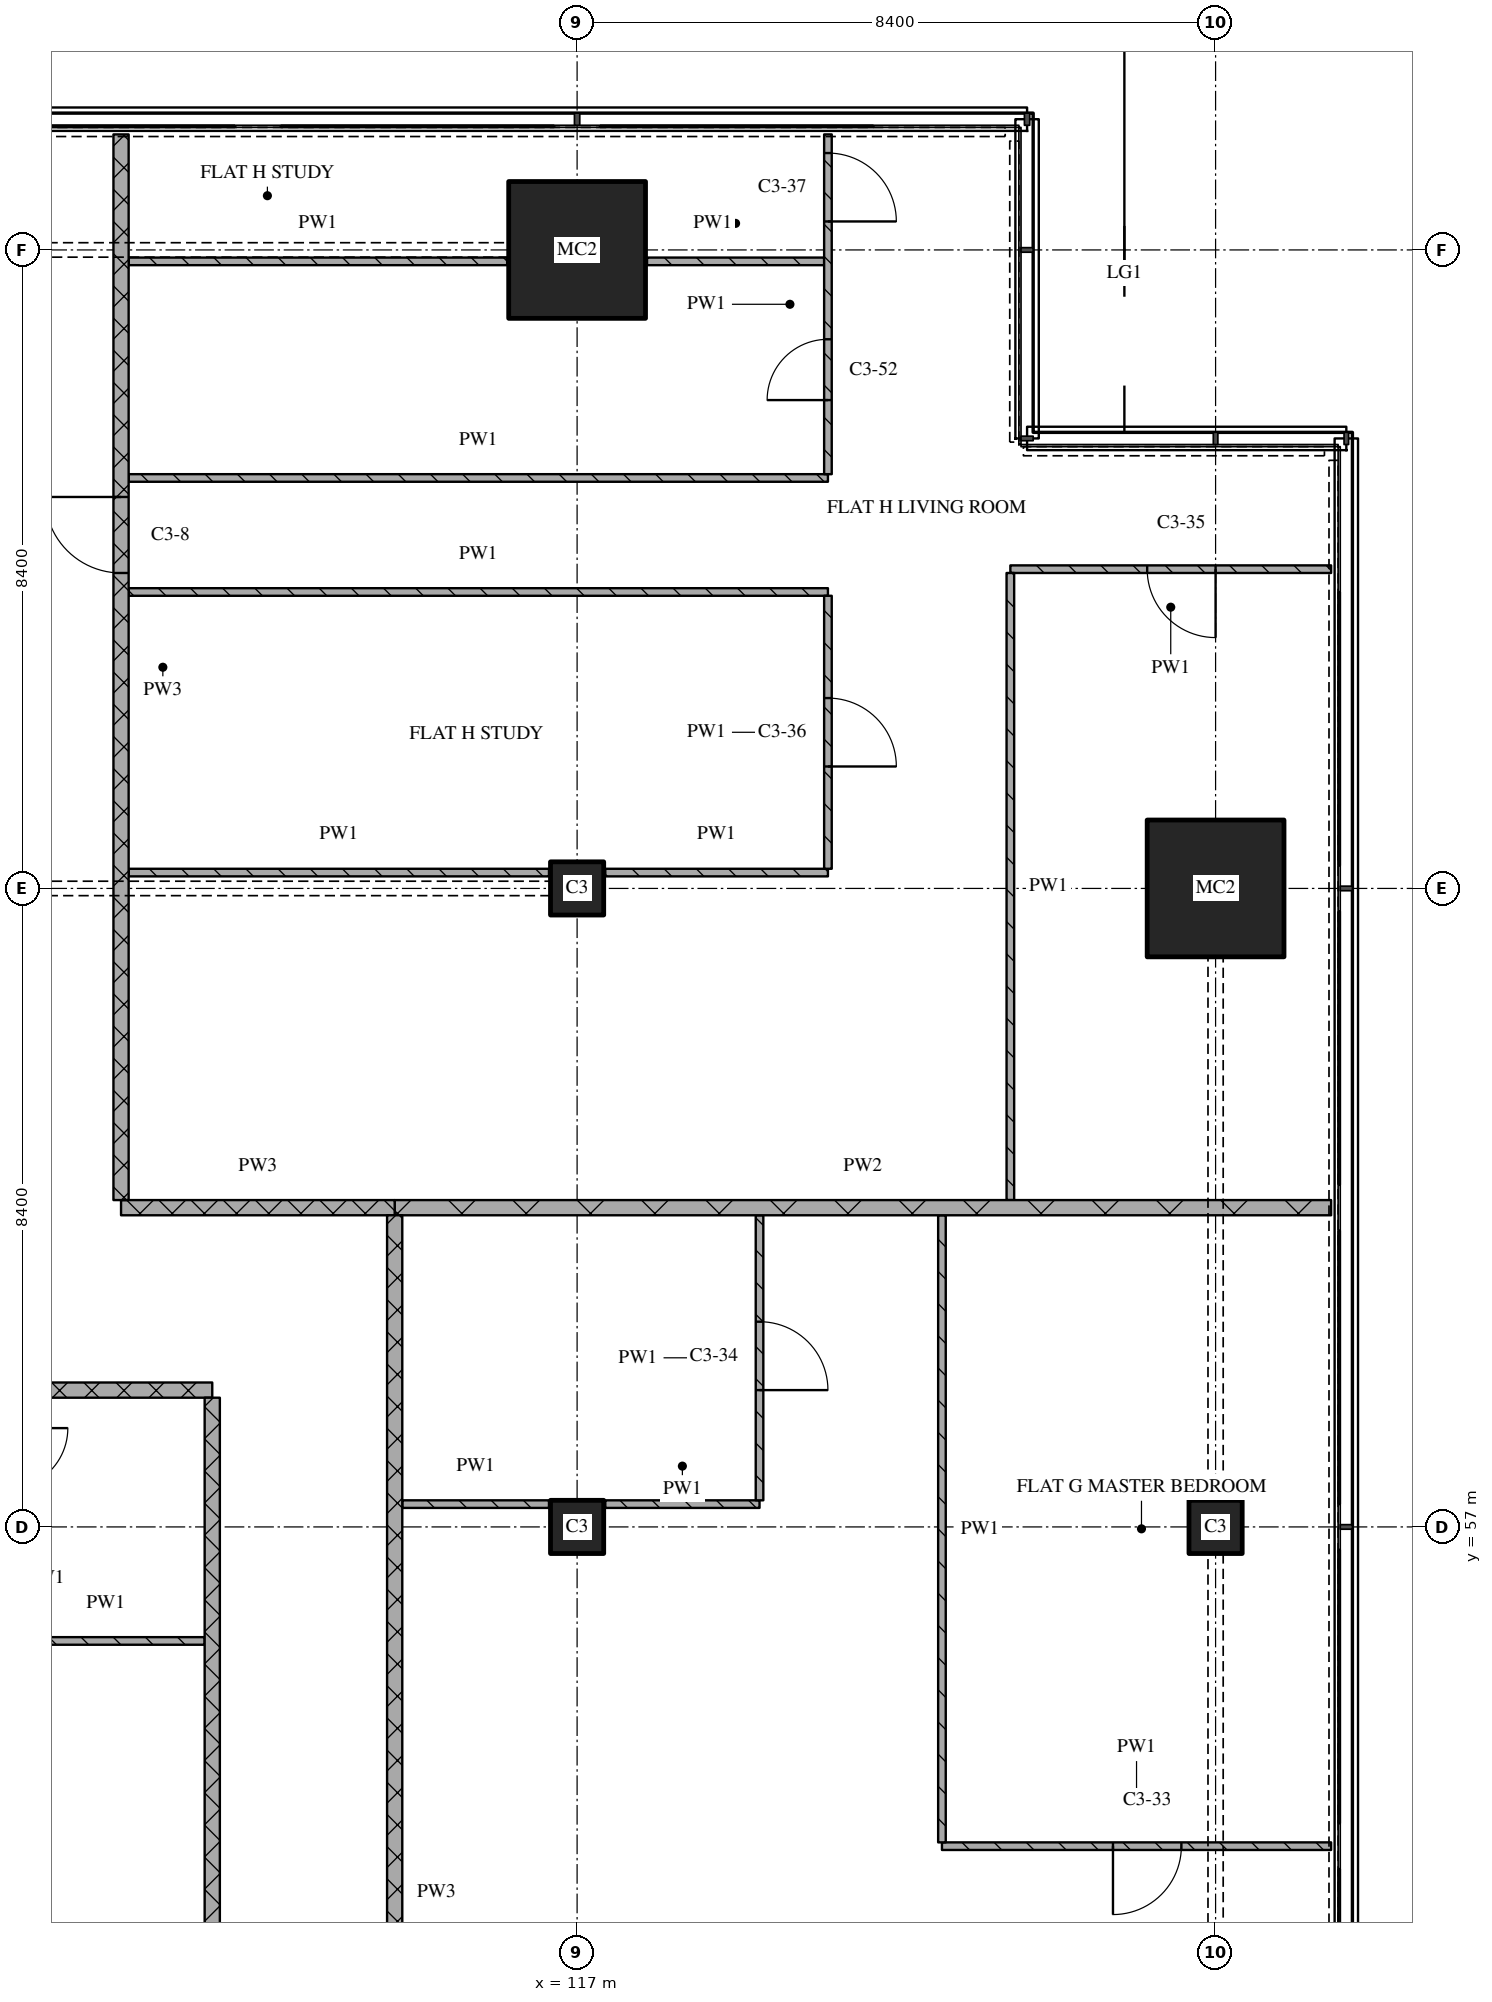
"""IFC4 building model, lengths in metres.
Left out: names, types, materials, properties, quantities, classifications, styles, units other than length and angle.
Written with IfcOpenShell. Run it as: python <this file> out.ifc"""

import sys

from ifc_helpers import new_model, si_unit, direction, frame, frame_2d, origin, origin_2d, place, context, subcontext, project, spatial, rectangle, extrude, element, fill, save


model = new_model("IFC4")
c1 = context("Model", 3, precision=1e-05, world=origin(), true_north=direction((0.0, 1.0)))
c2 = subcontext(c1, "Body", "Model", "MODEL_VIEW")
j1 = project(units=[si_unit("LENGTHUNIT", "METRE"), si_unit("PLANEANGLEUNIT", "RADIAN")], contexts=[c1])
p1 = place(None, origin())
s1 = spatial("IfcSite", under=j1, at=p1, CompositionType="ELEMENT")
p2 = place(p1, origin())
s2 = spatial("IfcBuilding", under=s1, at=p2, CompositionType="ELEMENT")
p3 = place(p2, frame((0.0, 0.0, 169.05)))
s3 = spatial("IfcBuildingStorey", under=s2, at=p3, CompositionType="ELEMENT", Elevation=169.05)
for number, where, z_axis, x_axis in (
    (1, (117.0, 57.0, 0.0), (0.0, 0.0, 1.0), (1.0, 0.0, 0.0)),
    (2, (117.0, 65.4, 0.0), (0.0, 0.0, 1.0), (1.0, 0.0, 0.0)),
):
    element("IfcColumn", number, at=place(p3, frame(where, z_axis=z_axis, x_axis=x_axis)), inside=s3, PredefinedType="COLUMN", context=c2, shape_type="SweptSolid", body=[
        extrude(rectangle(XDim=0.7, YDim=0.7, at=origin_2d()), origin(), (0.0, 0.0, 1.0), 3.6),
    ])
p4 = place(p3, frame((117.0, 73.8, 0.0), z_axis=(0.0, 0.0, 1.0), x_axis=(1.0, 0.0, 0.0)))
e3 = element("IfcColumn", 3, at=p4, inside=s3, PredefinedType="COLUMN", context=c2, shape_type="SweptSolid", body=[
    extrude(rectangle(XDim=1.8, YDim=1.8, at=origin_2d()), origin(), (0.0, 0.0, 1.0), 3.6),
])
p5 = place(p3, frame((125.4, 57.0, 0.0), z_axis=(0.0, 0.0, 1.0), x_axis=(1.0, 0.0, 0.0)))
e4 = element("IfcColumn", 4, at=p5, inside=s3, PredefinedType="COLUMN", context=c2, shape_type="SweptSolid", body=[
    extrude(rectangle(XDim=0.7, YDim=0.7, at=origin_2d()), origin(), (0.0, 0.0, 1.0), 3.6),
])
p6 = place(p3, frame((125.4, 65.4, 0.0), z_axis=(0.0, 0.0, 1.0), x_axis=(1.0, 0.0, 0.0)))
e5 = element("IfcColumn", 5, at=p6, inside=s3, PredefinedType="COLUMN", context=c2, shape_type="SweptSolid", body=[
    extrude(rectangle(XDim=1.8, YDim=1.8, at=origin_2d()), origin(), (0.0, 0.0, 1.0), 3.6),
])
p7 = place(p3, frame((121.8, 52.8, 0.0), z_axis=(0.0, 0.0, 1.0), x_axis=(1.0, 0.0, 0.0)))
e6 = element("IfcWall", 6, at=p7, inside=s3, PredefinedType="PARTITIONING", context=c2, shape_type="SweptSolid", body=[
    extrude(rectangle(XDim=5.12, YDim=0.1, at=frame_2d((2.56, 0.0))), origin(), (0.0, 0.0, 1.0), 3.32),
])
p8 = place(p7, frame((2.25, 0.0, 0.0)))
e7 = element("IfcOpeningElement", 7, at=p8, cuts=e6, PredefinedType="OPENING", context=c2, shape_type="SweptSolid", body=[
    extrude(rectangle(XDim=0.9, YDim=2.1, at=frame_2d((0.45, 1.05))), frame((0.0, 0.06, 0.0), z_axis=(0.0, -1.0, 0.0), x_axis=(1.0, 0.0, 0.0)), (0.0, 0.0, 1.0), 0.12),
])
p9 = place(p3, frame((109.5, 55.5, 0.0), z_axis=(0.0, 0.0, 1.0), x_axis=(1.0, 0.0, 0.0)))
e8 = element("IfcWall", 8, at=p9, inside=s3, PredefinedType="PARTITIONING", context=c2, shape_type="SweptSolid", body=[
    extrude(rectangle(XDim=2.6, YDim=0.1, at=frame_2d((1.3, 0.0))), origin(), (0.0, 0.0, 1.0), 3.32),
])
p10 = place(p3, frame((114.7, 57.3, 0.0), z_axis=(0.0, 0.0, 1.0), x_axis=(1.0, 0.0, 0.0)))
e9 = element("IfcWall", 9, at=p10, inside=s3, PredefinedType="PARTITIONING", context=c2, shape_type="SweptSolid", body=[
    extrude(rectangle(XDim=1.93, YDim=0.1, at=frame_2d((0.965, 0.0))), origin(), (0.0, 0.0, 1.0), 3.32),
])
p11 = place(p3, frame((117.37, 57.3, 0.0), z_axis=(0.0, 0.0, 1.0), x_axis=(1.0, 0.0, 0.0)))
e10 = element("IfcWall", 10, at=p11, inside=s3, PredefinedType="PARTITIONING", context=c2, shape_type="SweptSolid", body=[
    extrude(rectangle(XDim=2.03, YDim=0.1, at=frame_2d((1.015, 0.0))), origin(), (0.0, 0.0, 1.0), 3.32),
])
p12 = place(p3, frame((112.2, 58.8, 0.0), z_axis=(0.0, 0.0, 1.0), x_axis=(-1.0, 0.0, 0.0)))
e11 = element("IfcWall", 11, at=p12, inside=s3, PredefinedType="PARTITIONING", context=c2, shape_type="SweptSolid", body=[
    extrude(rectangle(XDim=10.8, YDim=0.2, at=frame_2d((5.4, 0.0))), origin(), (0.0, 0.0, 1.0), 3.32),
])
p13 = place(p12, frame((2.85, 0.0, 0.0)))
e12 = element("IfcOpeningElement", 12, at=p13, cuts=e11, PredefinedType="OPENING", context=c2, shape_type="SweptSolid", body=[
    extrude(rectangle(XDim=1.0, YDim=2.1, at=frame_2d((0.5, 1.05))), frame((0.0, 0.11, 0.0), z_axis=(0.0, -1.0, 0.0), x_axis=(1.0, 0.0, 0.0)), (0.0, 0.0, 1.0), 0.22),
])
p14 = place(p3, frame((111.0, 61.2, 0.0), z_axis=(0.0, 0.0, 1.0), x_axis=(1.0, 0.0, 0.0)))
e13 = element("IfcWall", 13, at=p14, inside=s3, PredefinedType="PARTITIONING", context=c2, shape_type="SweptSolid", body=[
    extrude(rectangle(XDim=3.6, YDim=0.2, at=frame_2d((1.8, 0.0))), origin(), (0.0, 0.0, 1.0), 3.32),
])
p15 = place(p3, frame((114.6, 61.2, 0.0), z_axis=(0.0, 0.0, 1.0), x_axis=(1.0, 0.0, 0.0)))
e14 = element("IfcWall", 14, at=p15, inside=s3, PredefinedType="PARTITIONING", context=c2, shape_type="SweptSolid", body=[
    extrude(rectangle(XDim=12.32, YDim=0.2, at=frame_2d((6.16, 0.0))), origin(), (0.0, 0.0, 1.0), 3.32),
])
p16 = place(p3, frame((111.1, 65.609, 0.0), z_axis=(0.0, 0.0, 1.0), x_axis=(1.0, 0.0, 0.0)))
e15 = element("IfcWall", 15, at=p16, inside=s3, PredefinedType="PARTITIONING", context=c2, shape_type="SweptSolid", body=[
    extrude(rectangle(XDim=5.53, YDim=0.1, at=frame_2d((2.765, 0.0))), origin(), (0.0, 0.0, 1.0), 3.32),
])
p17 = place(p3, frame((117.37, 65.609, 0.0), z_axis=(0.0, 0.0, 1.0), x_axis=(1.0, 0.0, 0.0)))
e16 = element("IfcWall", 16, at=p17, inside=s3, PredefinedType="PARTITIONING", context=c2, shape_type="SweptSolid", body=[
    extrude(rectangle(XDim=2.93, YDim=0.1, at=frame_2d((1.465, 0.0))), origin(), (0.0, 0.0, 1.0), 3.32),
])
p18 = place(p3, frame((111.1, 69.3, 0.0), z_axis=(0.0, 0.0, 1.0), x_axis=(1.0, 0.0, 0.0)))
e17 = element("IfcWall", 17, at=p18, inside=s3, PredefinedType="PARTITIONING", context=c2, shape_type="SweptSolid", body=[
    extrude(rectangle(XDim=9.2, YDim=0.1, at=frame_2d((4.6, 0.0))), origin(), (0.0, 0.0, 1.0), 3.32),
])
p19 = place(p3, frame((126.92, 69.6, 0.0), z_axis=(0.0, 0.0, 1.0), x_axis=(-1.0, 0.0, 0.0)))
e18 = element("IfcWall", 18, at=p19, inside=s3, PredefinedType="PARTITIONING", context=c2, shape_type="SweptSolid", body=[
    extrude(rectangle(XDim=4.22, YDim=0.1, at=frame_2d((2.11, 0.0))), origin(), (0.0, 0.0, 1.0), 3.32),
])
p20 = place(p19, frame((1.52, 0.0, 0.0)))
e19 = element("IfcOpeningElement", 19, at=p20, cuts=e18, PredefinedType="OPENING", context=c2, shape_type="SweptSolid", body=[
    extrude(rectangle(XDim=0.9, YDim=2.1, at=frame_2d((0.45, 1.05))), frame((0.0, 0.06, 0.0), z_axis=(0.0, -1.0, 0.0), x_axis=(1.0, 0.0, 0.0)), (0.0, 0.0, 1.0), 0.12),
])
p21 = place(p3, frame((111.1, 70.8, 0.0), z_axis=(0.0, 0.0, 1.0), x_axis=(1.0, 0.0, 0.0)))
e20 = element("IfcWall", 20, at=p21, inside=s3, PredefinedType="PARTITIONING", context=c2, shape_type="SweptSolid", body=[
    extrude(rectangle(XDim=9.2, YDim=0.1, at=frame_2d((4.6, 0.0))), origin(), (0.0, 0.0, 1.0), 3.32),
])
p22 = place(p3, frame((111.1, 73.649, 0.0), z_axis=(0.0, 0.0, 1.0), x_axis=(1.0, 0.0, 0.0)))
e21 = element("IfcWall", 21, at=p22, inside=s3, PredefinedType="PARTITIONING", context=c2, shape_type="SweptSolid", body=[
    extrude(rectangle(XDim=4.98, YDim=0.1, at=frame_2d((2.49, 0.0))), origin(), (0.0, 0.0, 1.0), 3.32),
])
p23 = place(p3, frame((117.92, 73.649, 0.0), z_axis=(0.0, 0.0, 1.0), x_axis=(1.0, 0.0, 0.0)))
e22 = element("IfcWall", 22, at=p23, inside=s3, PredefinedType="PARTITIONING", context=c2, shape_type="SweptSolid", body=[
    extrude(rectangle(XDim=2.33, YDim=0.1, at=frame_2d((1.165, 0.0))), origin(), (0.0, 0.0, 1.0), 3.32),
])
p24 = place(p3, frame((111.0, 75.32, 0.0), z_axis=(0.0, 0.0, 1.0), x_axis=(0.0, -1.0, 0.0)))
e23 = element("IfcWall", 23, at=p24, inside=s3, PredefinedType="PARTITIONING", context=c2, shape_type="SweptSolid", body=[
    extrude(rectangle(XDim=14.02, YDim=0.2, at=frame_2d((7.01, 0.0))), origin(), (0.0, 0.0, 1.0), 3.32),
])
p25 = place(p24, frame((4.77, 0.0, 0.0)))
e24 = element("IfcOpeningElement", 24, at=p25, cuts=e23, PredefinedType="OPENING", context=c2, shape_type="SweptSolid", body=[
    extrude(rectangle(XDim=1.0, YDim=2.1, at=frame_2d((0.5, 1.05))), frame((0.0, 0.11, 0.0), z_axis=(0.0, -1.0, 0.0), x_axis=(1.0, 0.0, 0.0)), (0.0, 0.0, 1.0), 0.22),
])
p26 = place(p3, frame((112.2, 58.7, 0.0), z_axis=(0.0, 0.0, 1.0), x_axis=(0.0, -1.0, 0.0)))
e25 = element("IfcWall", 25, at=p26, inside=s3, PredefinedType="PARTITIONING", context=c2, shape_type="SweptSolid", body=[
    extrude(rectangle(XDim=15.4, YDim=0.2, at=frame_2d((7.7, 0.0))), origin(), (0.0, 0.0, 1.0), 3.32),
])
p27 = place(p3, frame((114.6, 61.1, 0.0), z_axis=(0.0, 0.0, 1.0), x_axis=(0.0, -1.0, 0.0)))
e26 = element("IfcWall", 26, at=p27, inside=s3, PredefinedType="PARTITIONING", context=c2, shape_type="SweptSolid", body=[
    extrude(rectangle(XDim=17.8, YDim=0.2, at=frame_2d((8.9, 0.0))), origin(), (0.0, 0.0, 1.0), 3.32),
])
p28 = place(p3, frame((119.4, 57.35, 0.0), z_axis=(0.0, 0.0, 1.0), x_axis=(0.0, 1.0, 0.0)))
e27 = element("IfcWall", 27, at=p28, inside=s3, PredefinedType="PARTITIONING", context=c2, shape_type="SweptSolid", body=[
    extrude(rectangle(XDim=3.75, YDim=0.1, at=frame_2d((1.875, 0.0))), origin(), (0.0, 0.0, 1.0), 3.32),
])
p29 = place(p28, frame((1.45, 0.0, 0.0)))
e28 = element("IfcOpeningElement", 28, at=p29, cuts=e27, PredefinedType="OPENING", context=c2, shape_type="SweptSolid", body=[
    extrude(rectangle(XDim=0.9, YDim=2.1, at=frame_2d((0.45, 1.05))), frame((0.0, 0.06, 0.0), z_axis=(0.0, -1.0, 0.0), x_axis=(1.0, 0.0, 0.0)), (0.0, 0.0, 1.0), 0.12),
])
p30 = place(p3, frame((120.3, 65.659, 0.0), z_axis=(0.0, 0.0, 1.0), x_axis=(0.0, 1.0, 0.0)))
e29 = element("IfcWall", 29, at=p30, inside=s3, PredefinedType="PARTITIONING", context=c2, shape_type="SweptSolid", body=[
    extrude(rectangle(XDim=3.591, YDim=0.1, at=frame_2d((1.796, 0.0))), origin(), (0.0, 0.0, 1.0), 3.32),
])
p31 = place(p30, frame((1.346, 0.0, 0.0)))
e30 = element("IfcOpeningElement", 30, at=p31, cuts=e29, PredefinedType="OPENING", context=c2, shape_type="SweptSolid", body=[
    extrude(rectangle(XDim=0.9, YDim=2.1, at=frame_2d((0.45, 1.05))), frame((0.0, 0.06, 0.0), z_axis=(0.0, -1.0, 0.0), x_axis=(1.0, 0.0, 0.0)), (0.0, 0.0, 1.0), 0.12),
])
p32 = place(p3, frame((120.3, 70.85, 0.0), z_axis=(0.0, 0.0, 1.0), x_axis=(0.0, 1.0, 0.0)))
e31 = element("IfcWall", 31, at=p32, inside=s3, PredefinedType="PARTITIONING", context=c2, shape_type="SweptSolid", body=[
    extrude(rectangle(XDim=4.47, YDim=0.1, at=frame_2d((2.235, 0.0))), origin(), (0.0, 0.0, 1.0), 3.32),
])
p33 = place(p32, frame((0.975, 0.0, 0.0)))
e32 = element("IfcOpeningElement", 32, at=p33, cuts=e31, PredefinedType="OPENING", context=c2, shape_type="SweptSolid", body=[
    extrude(rectangle(XDim=0.8, YDim=2.1, at=frame_2d((0.4, 1.05))), frame((0.0, 0.06, 0.0), z_axis=(0.0, -1.0, 0.0), x_axis=(1.0, 0.0, 0.0)), (0.0, 0.0, 1.0), 0.12),
])
p34 = place(p32, frame((3.325, 0.0, 0.0)))
e33 = element("IfcOpeningElement", 33, at=p34, cuts=e31, PredefinedType="OPENING", context=c2, shape_type="SweptSolid", body=[
    extrude(rectangle(XDim=0.9, YDim=2.1, at=frame_2d((0.45, 1.05))), frame((0.0, 0.06, 0.0), z_axis=(0.0, -1.0, 0.0), x_axis=(1.0, 0.0, 0.0)), (0.0, 0.0, 1.0), 0.12),
])
for number, where, z_axis, x_axis in (
    (34, (121.8, 61.1, 0.0), (0.0, 0.0, 1.0), (0.0, -1.0, 0.0)),
    (35, (122.7, 69.55, 0.0), (0.0, 0.0, 1.0), (0.0, -1.0, 0.0)),
):
    element("IfcWall", number, at=place(p3, frame(where, z_axis=z_axis, x_axis=x_axis)), inside=s3, PredefinedType="PARTITIONING", context=c2, shape_type="SweptSolid", body=[
        extrude(rectangle(XDim=8.25, YDim=0.1, at=frame_2d((4.125, 0.0))), origin(), (0.0, 0.0, 1.0), 3.32),
    ])
p35 = place(p8, origin())
e36 = element("IfcDoor", 36, at=p35, inside=s3, OperationType="SINGLE_SWING_RIGHT", PredefinedType="DOOR", context=c2, shape_type="SweptSolid", body=[
    extrude(rectangle(XDim=0.9, YDim=2.1, at=frame_2d((0.45, 1.05))), frame((0.0, 0.025, 0.0), z_axis=(0.0, -1.0, 0.0), x_axis=(1.0, 0.0, 0.0)), (0.0, 0.0, 1.0), 0.05),
])
fill(e7, e36)
p36 = place(p20, origin())
e37 = element("IfcDoor", 37, at=p36, inside=s3, OperationType="SINGLE_SWING_LEFT", PredefinedType="DOOR", context=c2, shape_type="SweptSolid", body=[
    extrude(rectangle(XDim=0.9, YDim=2.1, at=frame_2d((0.45, 1.05))), frame((0.0, 0.025, 0.0), z_axis=(0.0, -1.0, 0.0), x_axis=(1.0, 0.0, 0.0)), (0.0, 0.0, 1.0), 0.05),
])
fill(e19, e37)
p37 = place(p25, origin())
e38 = element("IfcDoor", 38, at=p37, inside=s3, OperationType="SINGLE_SWING_RIGHT", PredefinedType="DOOR", context=c2, shape_type="SweptSolid", body=[
    extrude(rectangle(XDim=1.0, YDim=2.1, at=frame_2d((0.5, 1.05))), frame((0.0, 0.025, 0.0), z_axis=(0.0, -1.0, 0.0), x_axis=(1.0, 0.0, 0.0)), (0.0, 0.0, 1.0), 0.05),
])
fill(e24, e38)
p38 = place(p29, origin())
e39 = element("IfcDoor", 39, at=p38, inside=s3, OperationType="SINGLE_SWING_RIGHT", PredefinedType="DOOR", context=c2, shape_type="SweptSolid", body=[
    extrude(rectangle(XDim=0.9, YDim=2.1, at=frame_2d((0.45, 1.05))), frame((0.0, 0.025, 0.0), z_axis=(0.0, -1.0, 0.0), x_axis=(1.0, 0.0, 0.0)), (0.0, 0.0, 1.0), 0.05),
])
fill(e28, e39)
p39 = place(p31, origin())
e40 = element("IfcDoor", 40, at=p39, inside=s3, OperationType="SINGLE_SWING_RIGHT", PredefinedType="DOOR", context=c2, shape_type="SweptSolid", body=[
    extrude(rectangle(XDim=0.9, YDim=2.1, at=frame_2d((0.45, 1.05))), frame((0.0, 0.025, 0.0), z_axis=(0.0, -1.0, 0.0), x_axis=(1.0, 0.0, 0.0)), (0.0, 0.0, 1.0), 0.05),
])
fill(e30, e40)
p40 = place(p33, origin())
e41 = element("IfcDoor", 41, at=p40, inside=s3, OperationType="SINGLE_SWING_LEFT", PredefinedType="DOOR", context=c2, shape_type="SweptSolid", body=[
    extrude(rectangle(XDim=0.8, YDim=2.1, at=frame_2d((0.4, 1.05))), frame((0.0, 0.025, 0.0), z_axis=(0.0, -1.0, 0.0), x_axis=(1.0, 0.0, 0.0)), (0.0, 0.0, 1.0), 0.05),
])
fill(e32, e41)
p41 = place(p34, origin())
e42 = element("IfcDoor", 42, at=p41, inside=s3, OperationType="SINGLE_SWING_RIGHT", PredefinedType="DOOR", context=c2, shape_type="SweptSolid", body=[
    extrude(rectangle(XDim=0.9, YDim=2.1, at=frame_2d((0.45, 1.05))), frame((0.0, 0.025, 0.0), z_axis=(0.0, -1.0, 0.0), x_axis=(1.0, 0.0, 0.0)), (0.0, 0.0, 1.0), 0.05),
])
fill(e33, e42)
save(model, sys.argv[1])
